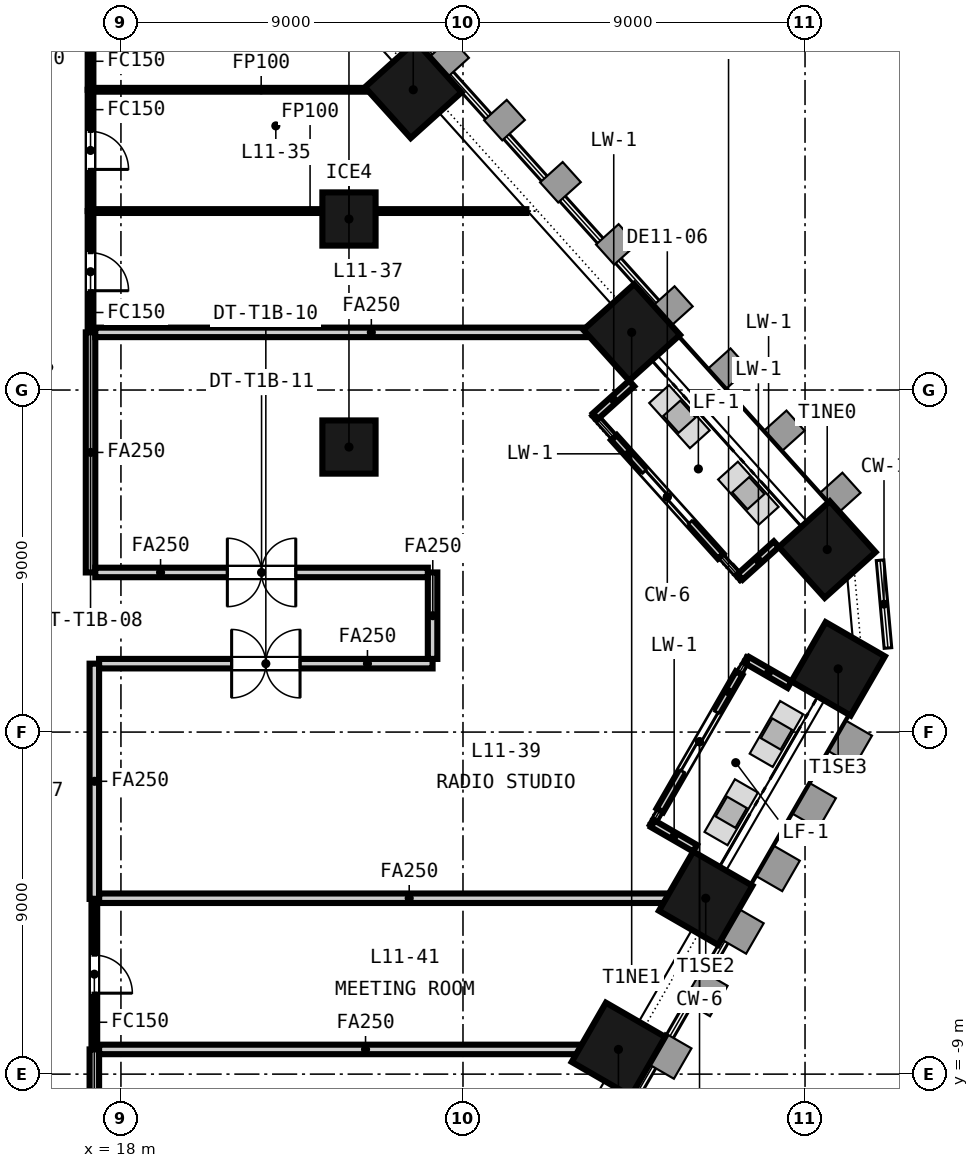
"""IFC4 building model, lengths in metres.
Left out: names, types, materials, properties, quantities, classifications, styles, units other than length and angle.
Written with IfcOpenShell. Run it as: python <this file> out.ifc"""

import sys

from ifc_helpers import new_model, si_unit, direction, frame, frame_2d, origin, origin_2d, place, context, subcontext, project, spatial, rectangle, extrude, element, fill, save


model = new_model("IFC4")
c1 = context("Model", 3, precision=1e-05, world=origin(), true_north=direction((0.0, 1.0)))
c2 = subcontext(c1, "Body", "Model", "MODEL_VIEW")
j1 = project(units=[si_unit("LENGTHUNIT", "METRE"), si_unit("PLANEANGLEUNIT", "RADIAN")], contexts=[c1])
p1 = place(None, origin())
s1 = spatial("IfcSite", under=j1, at=p1, CompositionType="ELEMENT")
p2 = place(p1, origin())
s2 = spatial("IfcBuilding", under=s1, at=p2, CompositionType="ELEMENT")
p3 = place(p2, frame((0.0, 0.0, 54.25)))
s3 = spatial("IfcBuildingStorey", under=s2, at=p3, CompositionType="ELEMENT", Elevation=54.25)
for number, where, z_axis, x_axis in (
    (1, (31.09, -8.35, -0.15), (0.0, 0.0, 1.0), (0.5, 0.866, 0.0)),
    (2, (33.387, -4.373, -0.15), (0.0, 0.0, 1.0), (0.5, 0.866, 0.0)),
    (3, (36.872, 1.663, -0.15), (0.0, 0.0, 1.0), (0.5, 0.866, 0.0)),
    (4, (36.584, 4.803, -0.15), (0.0, 0.0, 1.0), (-0.669, 0.743, 0.0)),
    (5, (31.438, 10.517, -0.15), (0.0, 0.0, 1.0), (-0.669, 0.743, 0.0)),
    (6, (25.691, 16.9, -0.15), (0.0, 0.0, 1.0), (-0.669, 0.743, 0.0)),
):
    element("IfcColumn", number, at=place(p3, frame(where, z_axis=z_axis, x_axis=x_axis)), inside=s3, PredefinedType="COLUMN", context=c2, shape_type="SweptSolid", body=[
        extrude(rectangle(XDim=1.8, YDim=1.8, at=origin_2d()), origin(), (0.0, 0.0, 1.0), 3.65),
    ])
for number, where, z_axis, x_axis in (
    (7, (24.0, 7.5, -0.15), (0.0, 0.0, 1.0), (1.0, 0.0, 0.0)),
    (8, (24.0, 13.5, -0.15), (0.0, 0.0, 1.0), (1.0, 0.0, 0.0)),
):
    element("IfcColumn", number, at=place(p3, frame(where, z_axis=z_axis, x_axis=x_axis)), inside=s3, PredefinedType="COLUMN", context=c2, shape_type="SweptSolid", body=[
        extrude(rectangle(XDim=1.4, YDim=1.4, at=origin_2d()), origin(), (0.0, 0.0, 1.0), 3.65),
    ])
p4 = place(p3, frame((32.181, -2.06, 0.0), z_axis=(0.0, 0.0, 1.0), x_axis=(0.500043453909, 0.866000314205, 0.0)))
e9 = element("IfcWall", 9, at=p4, inside=s3, PredefinedType="SOLIDWALL", context=c2, shape_type="SweptSolid", body=[
    extrude(rectangle(XDim=4.17, YDim=0.2, at=frame_2d((2.085, 0.0))), origin(), (0.0, 0.0, 1.0), 2.821),
])
p5 = place(p4, frame((1.185, 0.0, 0.0)))
e10 = element("IfcOpeningElement", 10, at=p5, cuts=e9, PredefinedType="OPENING", context=c2, shape_type="SweptSolid", body=[
    extrude(rectangle(XDim=1.8, YDim=2.4, at=frame_2d((0.9, 1.2))), frame((0.0, 0.11, 0.0), z_axis=(0.0, -1.0, 0.0), x_axis=(1.0, 0.0, 0.0)), (0.0, 0.0, 1.0), 0.22),
])
for number, where, z_axis, x_axis in (
    (11, (33.107, -3.056, 0.0), (0.0, 0.0, 1.0), (-0.866, 0.5, 0.0)),
    (12, (35.592, 1.247, 0.0), (0.0, 0.0, 1.0), (-0.866, 0.5, 0.0)),
):
    element("IfcWall", number, at=place(p3, frame(where, z_axis=z_axis, x_axis=x_axis)), inside=s3, PredefinedType="SOLIDWALL", context=c2, shape_type="SweptSolid", body=[
        extrude(rectangle(XDim=1.284, YDim=0.2, at=frame_2d((0.642, 0.0))), origin(), (0.0, 0.0, 1.0), 3.05),
    ])
p6 = place(p3, frame((33.781, 4.627, 0.0), z_axis=(0.0, 0.0, 1.0), x_axis=(-0.669138140895, 0.743138041282, 0.0)))
e13 = element("IfcWall", 13, at=p6, inside=s3, PredefinedType="SOLIDWALL", context=c2, shape_type="SweptSolid", body=[
    extrude(rectangle(XDim=4.2, YDim=0.2, at=frame_2d((2.1, 0.0))), origin(), (0.0, 0.0, 1.0), 2.821),
])
p7 = place(p6, frame((1.2, 0.0, 0.0)))
e14 = element("IfcOpeningElement", 14, at=p7, cuts=e13, PredefinedType="OPENING", context=c2, shape_type="SweptSolid", body=[
    extrude(rectangle(XDim=1.8, YDim=2.4, at=frame_2d((0.9, 1.2))), frame((0.0, 0.11, 0.0), z_axis=(0.0, -1.0, 0.0), x_axis=(1.0, 0.0, 0.0)), (0.0, 0.0, 1.0), 0.22),
])
p8 = place(p3, frame((35.246, 4.944, 0.0), z_axis=(0.0, 0.0, 1.0), x_axis=(-0.743123928629, -0.669153813932, 0.0)))
e15 = element("IfcWall", 15, at=p8, inside=s3, PredefinedType="SOLIDWALL", context=c2, shape_type="SweptSolid", body=[
    extrude(rectangle(XDim=1.284, YDim=0.2, at=frame_2d((0.642, 0.0))), origin(), (0.0, 0.0, 1.0), 2.821),
])
p9 = place(p3, frame((31.439, 9.172, 0.0), z_axis=(0.0, 0.0, 1.0), x_axis=(-0.743123928629, -0.669153813932, 0.0)))
e16 = element("IfcWall", 16, at=p9, inside=s3, PredefinedType="SOLIDWALL", context=c2, shape_type="SweptSolid", body=[
    extrude(rectangle(XDim=1.284, YDim=0.2, at=frame_2d((0.642, 0.0))), origin(), (0.0, 0.0, 1.0), 3.05),
])
p10 = place(p3, frame((17.2, 18.4, 0.0), z_axis=(0.0, 0.0, 1.0), x_axis=(0.0, -1.0, 0.0)))
e17 = element("IfcWall", 17, at=p10, inside=s3, PredefinedType="PARTITIONING", context=c2, shape_type="SweptSolid", body=[
    extrude(rectangle(XDim=1.5, YDim=0.15, at=frame_2d((0.75, 0.0))), origin(), (0.0, 0.0, 1.0), 2.741),
])
p11 = place(p3, frame((17.2, 16.9, 0.0), z_axis=(0.0, 0.0, 1.0), x_axis=(0.0, -1.0, 0.0)))
e18 = element("IfcWall", 18, at=p11, inside=s3, PredefinedType="PARTITIONING", context=c2, shape_type="SweptSolid", body=[
    extrude(rectangle(XDim=3.191, YDim=0.15, at=frame_2d((1.595, 0.0))), origin(), (0.0, 0.0, 1.0), 2.741),
])
p12 = place(p11, frame((1.095, 0.0, 0.0)))
e19 = element("IfcOpeningElement", 19, at=p12, cuts=e18, PredefinedType="OPENING", context=c2, shape_type="SweptSolid", body=[
    extrude(rectangle(XDim=1.0, YDim=2.1, at=frame_2d((0.5, 1.05))), frame((0.0, 0.085, 0.0), z_axis=(0.0, -1.0, 0.0), x_axis=(1.0, 0.0, 0.0)), (0.0, 0.0, 1.0), 0.17),
])
p13 = place(p3, frame((17.2, 13.709, 0.0), z_axis=(0.0, 0.0, 1.0), x_axis=(0.0, -1.0, 0.0)))
e20 = element("IfcWall", 20, at=p13, inside=s3, PredefinedType="PARTITIONING", context=c2, shape_type="SweptSolid", body=[
    extrude(rectangle(XDim=3.192, YDim=0.15, at=frame_2d((1.596, 0.0))), origin(), (0.0, 0.0, 1.0), 2.741),
])
p14 = place(p13, frame((1.096, 0.0, 0.0)))
e21 = element("IfcOpeningElement", 21, at=p14, cuts=e20, PredefinedType="OPENING", context=c2, shape_type="SweptSolid", body=[
    extrude(rectangle(XDim=1.0, YDim=2.1, at=frame_2d((0.5, 1.05))), frame((0.0, 0.085, 0.0), z_axis=(0.0, -1.0, 0.0), x_axis=(1.0, 0.0, 0.0)), (0.0, 0.0, 1.0), 0.17),
])
p15 = place(p3, frame((17.2, 10.517, 0.0), z_axis=(0.0, 0.0, 1.0), x_axis=(0.0, -1.0, 0.0)))
e22 = element("IfcWall", 22, at=p15, inside=s3, PredefinedType="PARTITIONING", context=c2, shape_type="SweptSolid", body=[
    extrude(rectangle(XDim=6.317, YDim=0.25, at=frame_2d((3.159, 0.0))), origin(), (0.0, 0.0, 1.0), 2.741),
])
p16 = place(p3, frame((17.3, 1.8, 0.0), z_axis=(0.0, 0.0, 1.0), x_axis=(0.0, -1.0, 0.0)))
e23 = element("IfcWall", 23, at=p16, inside=s3, PredefinedType="PARTITIONING", context=c2, shape_type="SweptSolid", body=[
    extrude(rectangle(XDim=6.19, YDim=0.25, at=frame_2d((3.095, 0.0))), origin(), (0.0, 0.0, 1.0), 2.741),
])
p17 = place(p3, frame((26.2, 1.8, 0.0), z_axis=(0.0, 0.0, 1.0), x_axis=(-1.0, 0.0, 0.0)))
e24 = element("IfcWall", 24, at=p17, inside=s3, PredefinedType="PARTITIONING", context=c2, shape_type="SweptSolid", body=[
    extrude(rectangle(XDim=8.775, YDim=0.25, at=frame_2d((4.387, 0.0))), origin(), (0.0, 0.0, 1.0), 2.741),
])
p18 = place(p17, frame((3.488, 0.0, 0.0)))
e25 = element("IfcOpeningElement", 25, at=p18, cuts=e24, PredefinedType="OPENING", context=c2, shape_type="SweptSolid", body=[
    extrude(rectangle(XDim=1.8, YDim=2.1, at=frame_2d((0.9, 1.05))), frame((0.0, 0.135, 0.0), z_axis=(0.0, -1.0, 0.0), x_axis=(1.0, 0.0, 0.0)), (0.0, 0.0, 1.0), 0.27),
])
p19 = place(p3, frame((26.2, 4.2, 0.0), z_axis=(0.0, 0.0, 1.0), x_axis=(0.0, -1.0, 0.0)))
e26 = element("IfcWall", 26, at=p19, inside=s3, PredefinedType="PARTITIONING", context=c2, shape_type="SweptSolid", body=[
    extrude(rectangle(XDim=2.275, YDim=0.25, at=frame_2d((1.137, 0.0))), origin(), (0.0, 0.0, 1.0), 2.741),
])
p20 = place(p3, frame((17.3, -4.39, 0.0), z_axis=(0.0, 0.0, 1.0), x_axis=(0.0, -1.0, 0.0)))
e27 = element("IfcWall", 27, at=p20, inside=s3, PredefinedType="PARTITIONING", context=c2, shape_type="SweptSolid", body=[
    extrude(rectangle(XDim=3.96, YDim=0.15, at=frame_2d((1.98, 0.0))), origin(), (0.0, 0.0, 1.0), 2.741),
])
p21 = place(p20, frame((1.48, 0.0, 0.0)))
e28 = element("IfcOpeningElement", 28, at=p21, cuts=e27, PredefinedType="OPENING", context=c2, shape_type="SweptSolid", body=[
    extrude(rectangle(XDim=1.0, YDim=2.1, at=frame_2d((0.5, 1.05))), frame((0.0, 0.085, 0.0), z_axis=(0.0, -1.0, 0.0), x_axis=(1.0, 0.0, 0.0)), (0.0, 0.0, 1.0), 0.17),
])
p22 = place(p3, frame((17.3, -8.35, 0.0), z_axis=(0.0, 0.0, 1.0), x_axis=(0.0, -1.0, 0.0)))
e29 = element("IfcWall", 29, at=p22, inside=s3, PredefinedType="PARTITIONING", context=c2, shape_type="SweptSolid", body=[
    extrude(rectangle(XDim=3.925, YDim=0.25, at=frame_2d((1.962, 0.0))), origin(), (0.0, 0.0, 1.0), 2.741),
])
p23 = place(p3, frame((17.275, 16.9, 0.0), z_axis=(0.0, 0.0, 1.0), x_axis=(1.0, 0.0, 0.0)))
e30 = element("IfcWall", 30, at=p23, inside=s3, PredefinedType="PARTITIONING", context=c2, shape_type="SweptSolid", body=[
    extrude(rectangle(XDim=8.82, YDim=0.1, at=frame_2d((4.41, 0.0))), origin(), (0.0, 0.0, 1.0), 2.741),
])
p24 = place(p3, frame((17.275, 13.709, 0.0), z_axis=(0.0, 0.0, 1.0), x_axis=(1.0, 0.0, 0.0)))
e31 = element("IfcWall", 31, at=p24, inside=s3, PredefinedType="PARTITIONING", context=c2, shape_type="SweptSolid", body=[
    extrude(rectangle(XDim=11.393, YDim=0.1, at=frame_2d((5.697, 0.0))), origin(), (0.0, 0.0, 1.0), 2.741),
])
p25 = place(p3, frame((17.325, 10.517, 0.0), z_axis=(0.0, 0.0, 1.0), x_axis=(1.0, 0.0, 0.0)))
e32 = element("IfcWall", 32, at=p25, inside=s3, PredefinedType="PARTITIONING", context=c2, shape_type="SweptSolid", body=[
    extrude(rectangle(XDim=14.517, YDim=0.25, at=frame_2d((7.259, 0.0))), origin(), (0.0, 0.0, 1.0), 2.741),
])
p26 = place(p3, frame((17.325, 4.2, 0.0), z_axis=(0.0, 0.0, 1.0), x_axis=(1.0, 0.0, 0.0)))
e33 = element("IfcWall", 33, at=p26, inside=s3, PredefinedType="PARTITIONING", context=c2, shape_type="SweptSolid", body=[
    extrude(rectangle(XDim=8.75, YDim=0.25, at=frame_2d((4.375, 0.0))), origin(), (0.0, 0.0, 1.0), 2.741),
])
p27 = place(p26, frame((3.475, 0.0, 0.0)))
e34 = element("IfcOpeningElement", 34, at=p27, cuts=e33, PredefinedType="OPENING", context=c2, shape_type="SweptSolid", body=[
    extrude(rectangle(XDim=1.8, YDim=2.1, at=frame_2d((0.9, 1.05))), frame((0.0, 0.135, 0.0), z_axis=(0.0, -1.0, 0.0), x_axis=(1.0, 0.0, 0.0)), (0.0, 0.0, 1.0), 0.27),
])
p28 = place(p3, frame((17.427, -4.372, 0.0), z_axis=(0.0, 0.0, 1.0), x_axis=(1.0, 0.0, 0.0)))
e35 = element("IfcWall", 35, at=p28, inside=s3, PredefinedType="PARTITIONING", context=c2, shape_type="SweptSolid", body=[
    extrude(rectangle(XDim=16.306, YDim=0.25, at=frame_2d((8.153, 0.0))), origin(), (0.0, 0.0, 1.0), 2.741),
])
p29 = place(p3, frame((17.425, -8.35, 0.0), z_axis=(0.0, 0.0, 1.0), x_axis=(1.0, 0.0, 0.0)))
e36 = element("IfcWall", 36, at=p29, inside=s3, PredefinedType="PARTITIONING", context=c2, shape_type="SweptSolid", body=[
    extrude(rectangle(XDim=14.012, YDim=0.25, at=frame_2d((7.006, 0.0))), origin(), (0.0, 0.0, 1.0), 2.741),
])
p30 = place(p5, origin())
e37 = element("IfcDoor", 37, at=p30, inside=s3, OperationType="SINGLE_SWING_LEFT", PredefinedType="DOOR", context=c2, shape_type="SweptSolid", body=[
    extrude(rectangle(XDim=1.8, YDim=2.4, at=frame_2d((0.9, 1.2))), frame((0.0, 0.025, 0.0), z_axis=(0.0, -1.0, 0.0), x_axis=(1.0, 0.0, 0.0)), (0.0, 0.0, 1.0), 0.05),
])
fill(e10, e37)
p31 = place(p7, origin())
e38 = element("IfcDoor", 38, at=p31, inside=s3, OperationType="SINGLE_SWING_LEFT", PredefinedType="DOOR", context=c2, shape_type="SweptSolid", body=[
    extrude(rectangle(XDim=1.8, YDim=2.4, at=frame_2d((0.9, 1.2))), frame((0.0, 0.025, 0.0), z_axis=(0.0, -1.0, 0.0), x_axis=(1.0, 0.0, 0.0)), (0.0, 0.0, 1.0), 0.05),
])
fill(e14, e38)
p32 = place(p12, origin())
e39 = element("IfcDoor", 39, at=p32, inside=s3, OperationType="SINGLE_SWING_RIGHT", PredefinedType="DOOR", context=c2, shape_type="SweptSolid", body=[
    extrude(rectangle(XDim=1.0, YDim=2.1, at=frame_2d((0.5, 1.05))), frame((0.0, 0.025, 0.0), z_axis=(0.0, -1.0, 0.0), x_axis=(1.0, 0.0, 0.0)), (0.0, 0.0, 1.0), 0.05),
])
fill(e19, e39)
p33 = place(p14, origin())
e40 = element("IfcDoor", 40, at=p33, inside=s3, OperationType="SINGLE_SWING_RIGHT", PredefinedType="DOOR", context=c2, shape_type="SweptSolid", body=[
    extrude(rectangle(XDim=1.0, YDim=2.1, at=frame_2d((0.5, 1.05))), frame((0.0, 0.025, 0.0), z_axis=(0.0, -1.0, 0.0), x_axis=(1.0, 0.0, 0.0)), (0.0, 0.0, 1.0), 0.05),
])
fill(e21, e40)
p34 = place(p18, origin())
e41 = element("IfcDoor", 41, at=p34, inside=s3, OperationType="DOUBLE_DOOR_DOUBLE_SWING", PredefinedType="DOOR", context=c2, shape_type="SweptSolid", body=[
    extrude(rectangle(XDim=1.8, YDim=2.1, at=frame_2d((0.9, 1.05))), frame((0.0, 0.025, 0.0), z_axis=(0.0, -1.0, 0.0), x_axis=(1.0, 0.0, 0.0)), (0.0, 0.0, 1.0), 0.05),
])
fill(e25, e41)
p35 = place(p27, origin())
e42 = element("IfcDoor", 42, at=p35, inside=s3, OperationType="DOUBLE_DOOR_DOUBLE_SWING", PredefinedType="DOOR", context=c2, shape_type="SweptSolid", body=[
    extrude(rectangle(XDim=1.8, YDim=2.1, at=frame_2d((0.9, 1.05))), frame((0.0, 0.025, 0.0), z_axis=(0.0, -1.0, 0.0), x_axis=(1.0, 0.0, 0.0)), (0.0, 0.0, 1.0), 0.05),
])
fill(e34, e42)
p36 = place(p21, origin())
e43 = element("IfcDoor", 43, at=p36, inside=s3, OperationType="SINGLE_SWING_RIGHT", PredefinedType="DOOR", context=c2, shape_type="SweptSolid", body=[
    extrude(rectangle(XDim=1.0, YDim=2.1, at=frame_2d((0.5, 1.05))), frame((0.0, 0.025, 0.0), z_axis=(0.0, -1.0, 0.0), x_axis=(1.0, 0.0, 0.0)), (0.0, 0.0, 1.0), 0.05),
])
fill(e28, e43)
save(model, sys.argv[1])
